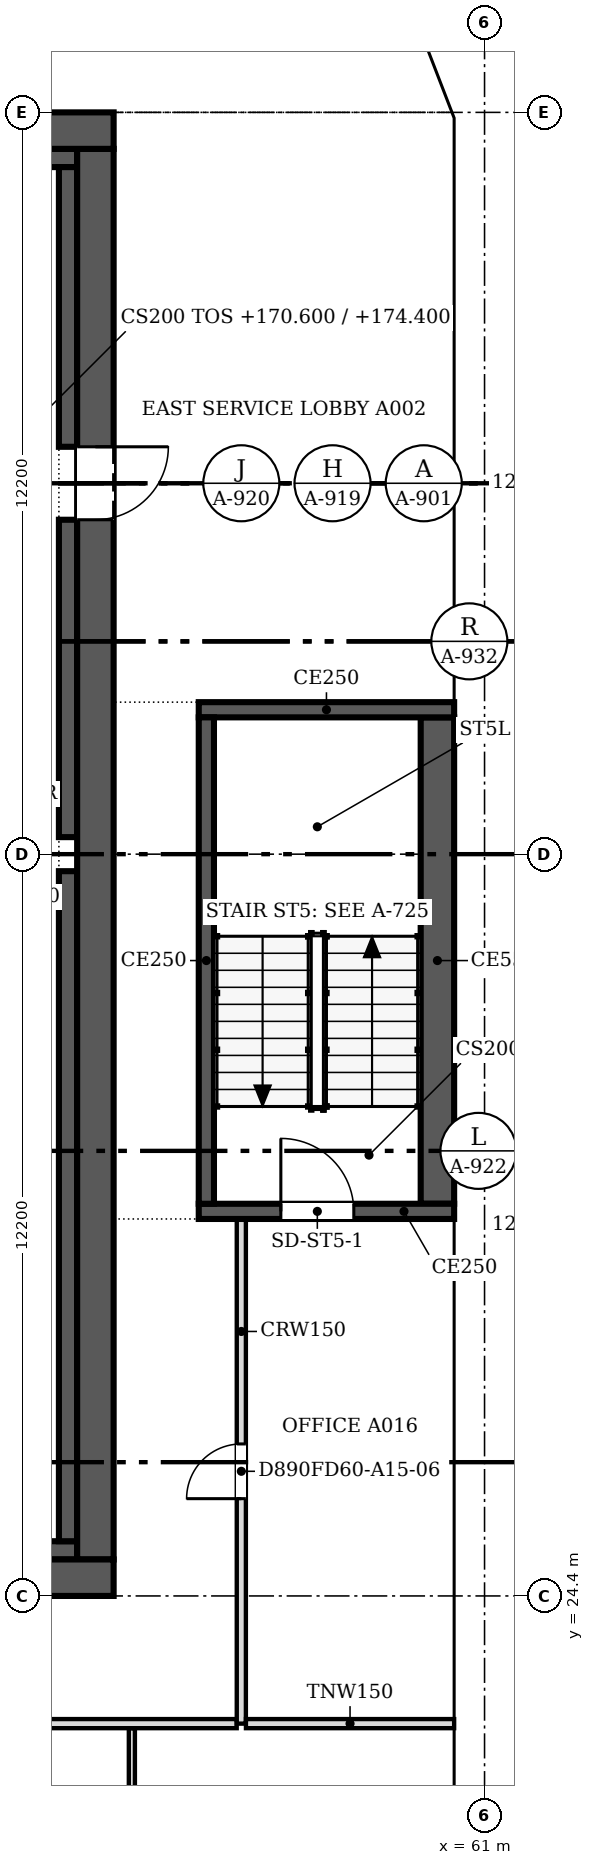
"""IFC4 building model, lengths in metres.
Left out: names, types, materials, properties, quantities, classifications, styles, units other than length and angle.
Written with IfcOpenShell. Run it as: python <this file> out.ifc"""

import sys

from ifc_helpers import new_model, si_unit, direction, frame, frame_2d, origin, place, context, subcontext, project, spatial, polyline, rectangle, outline, extrude, faceted_brep, source, transform, mapped, element, fill, save


model = new_model("IFC4")
c1 = context("Model", 3, precision=1e-05, world=origin(), true_north=direction((0.0, 1.0)))
c2 = subcontext(c1, "Body", "Model", "MODEL_VIEW")
j1 = project(units=[si_unit("LENGTHUNIT", "METRE"), si_unit("PLANEANGLEUNIT", "RADIAN")], contexts=[c1])
p1 = place(None, origin())
s1 = spatial("IfcSite", under=j1, at=p1, CompositionType="ELEMENT")
p2 = place(p1, origin())
s2 = spatial("IfcBuilding", under=s1, at=p2, CompositionType="ELEMENT")
p3 = place(p2, frame((0.0, 0.0, 170.6)))
s3 = spatial("IfcBuildingStorey", under=s2, at=p3, CompositionType="ELEMENT", Elevation=170.6)
m1 = source(origin(), c2, "Body", "Brep", [
    faceted_brep([(3.05, -0.25, 0.0), (6.1, -0.25, 3.8), (6.1, -0.25, 3.8), (3.05, -0.25, 7.6), (0.0, -0.25, 3.8), (0.0, 0.25, 3.8), (3.05, 0.25, 7.6), (6.1, 0.25, 3.8), (6.1, 0.25, 3.8), (3.05, 0.25, 0.0)], [[[0, 1, 2, 3, 4]], [[5, 6, 7, 8, 9]], [[9, 8, 1, 0]], [[7, 6, 3, 2]], [[6, 5, 4, 3]], [[5, 9, 0, 4]], [[1, 8, 7, 2]]]),
])
p4 = place(p3, frame((60.75, 18.3, -3.8), z_axis=(0.0, 0.0, 1.0), x_axis=(0.0, 1.0, 0.0)))
e1 = element("IfcWall", 1, at=p4, inside=s3, PredefinedType="SOLIDWALL", context=c2, shape_type="MappedRepresentation", body=[
    mapped(m1, transform((0.0, 0.0, 0.0), scale=1.0)),
])
m2 = source(origin(), c2, "Body", "SweptSolid", [
    extrude(outline(polyline([(3.05, 0.399), (5.78, 3.8), (3.05, 7.2), (0.321, 3.8), (3.05, 0.399)])), frame((0.0, 0.26, 0.0), z_axis=(0.0, -1.0, 0.0), x_axis=(1.0, 0.0, 0.0)), (0.0, 0.0, 1.0), 0.52),
])
p5 = place(p4, origin())
e2 = element("IfcOpeningElement", 2, at=p5, cuts=e1, PredefinedType="OPENING", context=c2, shape_type="MappedRepresentation", body=[
    mapped(m2, transform((0.0, 0.0, 0.0), scale=1.0)),
])
m3 = source(origin(), c2, "Body", "SweptSolid", [
    extrude(outline(polyline([(3.05, 0.0), (6.1, 3.8), (3.05, 7.6), (0.0, 3.8), (3.05, 0.0)])), frame((0.0, 0.25, 0.0), z_axis=(0.0, -1.0, 0.0), x_axis=(1.0, 0.0, 0.0)), (0.0, 0.0, 1.0), 0.5),
])
p6 = place(p3, frame((60.75, 24.4, -3.8), z_axis=(0.0, 0.0, 1.0), x_axis=(0.0, 1.0, 0.0)))
e3 = element("IfcWall", 3, at=p6, inside=s3, PredefinedType="SOLIDWALL", context=c2, shape_type="MappedRepresentation", body=[
    mapped(m3, transform((0.0, 0.0, 0.0), scale=1.0)),
])
p7 = place(p6, origin())
e4 = element("IfcOpeningElement", 4, at=p7, cuts=e3, PredefinedType="OPENING", context=c2, shape_type="MappedRepresentation", body=[
    mapped(m2, transform((0.0, 0.0, 0.0), scale=1.0)),
])
p8 = place(p3, frame((60.75, 30.5, -3.8), z_axis=(0.0, 0.0, 1.0), x_axis=(0.0, 1.0, 0.0)))
e5 = element("IfcWall", 5, at=p8, inside=s3, PredefinedType="SOLIDWALL", context=c2, shape_type="MappedRepresentation", body=[
    mapped(m3, transform((0.0, 0.0, 0.0), scale=1.0)),
])
p9 = place(p8, origin())
e6 = element("IfcOpeningElement", 6, at=p9, cuts=e5, PredefinedType="OPENING", context=c2, shape_type="MappedRepresentation", body=[
    mapped(m2, transform((0.0, 0.0, 0.0), scale=1.0)),
])
p10 = place(p3, frame((60.75, 36.6, -3.8), z_axis=(0.0, 0.0, 1.0), x_axis=(0.0, 1.0, 0.0)))
e7 = element("IfcWall", 7, at=p10, inside=s3, PredefinedType="SOLIDWALL", context=c2, shape_type="MappedRepresentation", body=[
    mapped(m1, transform((0.0, 0.0, 0.0), scale=1.0)),
])
p11 = place(p10, origin())
e8 = element("IfcOpeningElement", 8, at=p11, cuts=e7, PredefinedType="OPENING", context=c2, shape_type="MappedRepresentation", body=[
    mapped(m2, transform((0.0, 0.0, 0.0), scale=1.0)),
])
m4 = source(origin(), c2, "Body", "Brep", [
    faceted_brep([(3.05, -0.25, 0.0), (6.053, -0.25, 3.8), (3.05, -0.25, 7.6), (0.0, -0.25, 3.8), (0.0, 0.25, 3.8), (3.05, 0.25, 7.6), (6.007, 0.25, 3.859), (6.007, 0.25, 3.741), (3.05, 0.25, 0.0), (6.053, 0.0, 3.8)], [[[0, 1, 2, 3]], [[4, 5, 6, 7, 8]], [[8, 7, 9, 1, 0]], [[6, 5, 2, 1, 9]], [[5, 4, 3, 2]], [[4, 8, 0, 3]], [[7, 6, 9]]]),
])
p12 = place(p3, frame((60.75, 42.7, -3.8), z_axis=(0.0, 0.0, 1.0), x_axis=(0.0, 1.0, 0.0)))
e9 = element("IfcWall", 9, at=p12, inside=s3, PredefinedType="SOLIDWALL", context=c2, shape_type="MappedRepresentation", body=[
    mapped(m4, transform((0.0, 0.0, 0.0), scale=1.0)),
])
m5 = source(origin(), c2, "Body", "SweptSolid", [
    extrude(outline(polyline([(3.049, 0.401), (5.735, 3.8), (3.049, 7.199), (0.321, 3.8), (3.049, 0.401)])), frame((0.0, 0.26, 0.0), z_axis=(0.0, -1.0, 0.0), x_axis=(1.0, 0.0, 0.0)), (0.0, 0.0, 1.0), 0.52),
])
p13 = place(p12, origin())
e10 = element("IfcOpeningElement", 10, at=p13, cuts=e9, PredefinedType="OPENING", context=c2, shape_type="MappedRepresentation", body=[
    mapped(m5, transform((0.0, 0.0, 0.0), scale=1.0)),
])
m6 = source(origin(), c2, "Body", "Brep", [
    faceted_brep([(2.95, -0.25, 0.0), (3.003, -0.25, 0.068), (3.003, -0.25, 7.531), (2.95, -0.25, 7.6), (0.0, -0.25, 3.8), (0.047, 0.25, 3.86), (2.898, 0.25, 7.532), (2.898, 0.25, 0.068), (0.047, 0.25, 3.74), (2.95, 0.0, 0.0), (2.95, 0.0, 7.6), (0.0, 0.0, 3.8)], [[[0, 1, 2, 3, 4]], [[5, 6, 7, 8]], [[1, 0, 9]], [[10, 3, 2]], [[6, 5, 11, 4, 3, 10]], [[8, 7, 9, 0, 4, 11]], [[8, 11, 5]], [[1, 9, 7, 6, 10, 2]]]),
])
p14 = place(p3, frame((60.75, 48.753, -3.8), z_axis=(0.0, 0.0, 1.0), x_axis=(-0.35992665181, 0.932980602862, 0.0)))
e11 = element("IfcWall", 11, at=p14, inside=s3, PredefinedType="SOLIDWALL", context=c2, shape_type="MappedRepresentation", body=[
    mapped(m6, transform((0.0, 0.0, 0.0), scale=1.0)),
])
m7 = source(origin(), c2, "Body", "SweptSolid", [
    extrude(outline(polyline([(2.75, 6.935), (0.316, 3.8), (2.75, 0.665), (2.75, 6.935)])), frame((0.0, 0.26, 0.0), z_axis=(0.0, -1.0, 0.0), x_axis=(1.0, 0.0, 0.0)), (0.0, 0.0, 1.0), 0.52),
])
p15 = place(p14, origin())
e12 = element("IfcOpeningElement", 12, at=p15, cuts=e11, PredefinedType="OPENING", context=c2, shape_type="MappedRepresentation", body=[
    mapped(m7, transform((0.0, 0.0, 0.0), scale=1.0)),
])
p16 = place(p2, frame((0.0, 0.0, 174.4)))
s4 = spatial("IfcBuildingStorey", under=s2, at=p16, CompositionType="ELEMENT", Elevation=174.4)
m8 = source(origin(), c2, "Body", "SweptSolid", [
    extrude(outline(polyline([(3.05, 0.0), (6.1, 3.8), (3.05, 7.6), (0.0, 3.8), (3.05, 0.0)])), frame((0.0, 0.25, 0.0), z_axis=(0.0, -1.0, 0.0), x_axis=(1.0, 0.0, 0.0)), (0.0, 0.0, 1.0), 0.5),
])
p17 = place(p16, frame((60.75, 15.25, -3.8), z_axis=(0.0, 0.0, 1.0), x_axis=(0.0, 1.0, 0.0)))
e13 = element("IfcWall", 13, at=p17, inside=s4, PredefinedType="SOLIDWALL", context=c2, shape_type="MappedRepresentation", body=[
    mapped(m8, transform((0.0, 0.0, 0.0), scale=1.0)),
])
m9 = source(origin(), c2, "Body", "SweptSolid", [
    extrude(outline(polyline([(3.05, 0.399), (5.78, 3.8), (3.05, 7.2), (0.321, 3.8), (3.05, 0.399)])), frame((0.0, 0.26, 0.0), z_axis=(0.0, -1.0, 0.0), x_axis=(1.0, 0.0, 0.0)), (0.0, 0.0, 1.0), 0.52),
])
p18 = place(p17, origin())
e14 = element("IfcOpeningElement", 14, at=p18, cuts=e13, PredefinedType="OPENING", context=c2, shape_type="MappedRepresentation", body=[
    mapped(m9, transform((0.0, 0.0, 0.0), scale=1.0)),
])
m10 = source(origin(), c2, "Body", "Brep", [
    faceted_brep([(3.05, -0.25, 0.0), (6.1, -0.25, 3.8), (6.1, -0.25, 3.8), (3.05, -0.25, 7.6), (0.0, -0.25, 3.8), (0.0, 0.25, 3.8), (3.05, 0.25, 7.6), (6.1, 0.25, 3.8), (6.1, 0.25, 3.8), (3.05, 0.25, 0.0)], [[[0, 1, 2, 3, 4]], [[5, 6, 7, 8, 9]], [[9, 8, 1, 0]], [[7, 6, 3, 2]], [[6, 5, 4, 3]], [[5, 9, 0, 4]], [[1, 8, 7, 2]]]),
])
p19 = place(p16, frame((60.75, 21.35, -3.8), z_axis=(0.0, 0.0, 1.0), x_axis=(0.0, 1.0, 0.0)))
e15 = element("IfcWall", 15, at=p19, inside=s4, PredefinedType="SOLIDWALL", context=c2, shape_type="MappedRepresentation", body=[
    mapped(m10, transform((0.0, 0.0, 0.0), scale=1.0)),
])
p20 = place(p19, origin())
e16 = element("IfcOpeningElement", 16, at=p20, cuts=e15, PredefinedType="OPENING", context=c2, shape_type="MappedRepresentation", body=[
    mapped(m9, transform((0.0, 0.0, 0.0), scale=1.0)),
])
p21 = place(p16, frame((60.75, 27.45, -3.8), z_axis=(0.0, 0.0, 1.0), x_axis=(0.0, 1.0, 0.0)))
e17 = element("IfcWall", 17, at=p21, inside=s4, PredefinedType="SOLIDWALL", context=c2, shape_type="MappedRepresentation", body=[
    mapped(m8, transform((0.0, 0.0, 0.0), scale=1.0)),
])
p22 = place(p21, origin())
e18 = element("IfcOpeningElement", 18, at=p22, cuts=e17, PredefinedType="OPENING", context=c2, shape_type="MappedRepresentation", body=[
    mapped(m9, transform((0.0, 0.0, 0.0), scale=1.0)),
])
p23 = place(p16, frame((60.75, 33.55, -3.8), z_axis=(0.0, 0.0, 1.0), x_axis=(0.0, 1.0, 0.0)))
e19 = element("IfcWall", 19, at=p23, inside=s4, PredefinedType="SOLIDWALL", context=c2, shape_type="MappedRepresentation", body=[
    mapped(m10, transform((0.0, 0.0, 0.0), scale=1.0)),
])
p24 = place(p23, origin())
e20 = element("IfcOpeningElement", 20, at=p24, cuts=e19, PredefinedType="OPENING", context=c2, shape_type="MappedRepresentation", body=[
    mapped(m9, transform((0.0, 0.0, 0.0), scale=1.0)),
])
p25 = place(p16, frame((60.75, 39.65, -3.8), z_axis=(0.0, 0.0, 1.0), x_axis=(0.0, 1.0, 0.0)))
e21 = element("IfcWall", 21, at=p25, inside=s4, PredefinedType="SOLIDWALL", context=c2, shape_type="MappedRepresentation", body=[
    mapped(m8, transform((0.0, 0.0, 0.0), scale=1.0)),
])
p26 = place(p25, origin())
e22 = element("IfcOpeningElement", 22, at=p26, cuts=e21, PredefinedType="OPENING", context=c2, shape_type="MappedRepresentation", body=[
    mapped(m9, transform((0.0, 0.0, 0.0), scale=1.0)),
])
m11 = source(origin(), c2, "Body", "Brep", [
    faceted_brep([(3.003, -0.25, 0.0), (3.05, -0.25, 0.06), (3.05, -0.25, 7.54), (3.003, -0.25, 7.6), (0.0, -0.25, 3.8), (0.0, 0.25, 3.8), (2.957, 0.25, 7.541), (2.957, 0.25, 0.059), (3.003, 0.0, 0.0), (3.003, 0.0, 7.6)], [[[0, 1, 2, 3, 4]], [[5, 6, 7]], [[1, 0, 8]], [[9, 3, 2]], [[6, 5, 4, 3, 9]], [[5, 7, 8, 0, 4]], [[1, 8, 7, 6, 9, 2]]]),
])
p27 = place(p16, frame((60.75, 45.75, -3.8), z_axis=(0.0, 0.0, 1.0), x_axis=(0.0, 1.0, 0.0)))
e23 = element("IfcWall", 23, at=p27, inside=s4, PredefinedType="SOLIDWALL", context=c2, shape_type="MappedRepresentation", body=[
    mapped(m11, transform((0.0, 0.0, 0.0), scale=1.0)),
])
m12 = source(origin(), c2, "Body", "SweptSolid", [
    extrude(outline(polyline([(2.803, 6.944), (0.319, 3.8), (2.803, 0.656), (2.803, 6.944)])), frame((0.0, 0.26, 0.0), z_axis=(0.0, -1.0, 0.0), x_axis=(1.0, 0.0, 0.0)), (0.0, 0.0, 1.0), 0.52),
])
p28 = place(p27, origin())
e24 = element("IfcOpeningElement", 24, at=p28, cuts=e23, PredefinedType="OPENING", context=c2, shape_type="MappedRepresentation", body=[
    mapped(m12, transform((0.0, 0.0, 0.0), scale=1.0)),
])
m13 = source(origin(), c2, "Body", "Brep", [
    faceted_brep([(0.047, -0.25, 0.0), (2.997, -0.25, 3.8), (0.047, -0.25, 7.6), (0.0, -0.25, 7.541), (0.0, -0.25, 0.059), (0.093, 0.25, 7.54), (2.944, 0.25, 3.868), (2.944, 0.25, 3.732), (0.093, 0.25, 0.06), (2.997, 0.0, 3.8), (0.047, 0.0, 0.0), (0.047, 0.0, 7.6)], [[[0, 1, 2, 3, 4]], [[5, 6, 7, 8]], [[8, 7, 9, 1, 0, 10]], [[6, 5, 11, 2, 1, 9]], [[3, 2, 11]], [[10, 0, 4]], [[8, 10, 4, 3, 11, 5]], [[9, 7, 6]]]),
])
p29 = place(p16, frame((60.767, 48.71, -3.8), z_axis=(0.0, 0.0, 1.0), x_axis=(-0.359901446078, 0.932990326376, 0.0)))
e25 = element("IfcWall", 25, at=p29, inside=s4, PredefinedType="SOLIDWALL", context=c2, shape_type="MappedRepresentation", body=[
    mapped(m13, transform((0.0, 0.0, 0.0), scale=1.0)),
])
m14 = source(origin(), c2, "Body", "SweptSolid", [
    extrude(outline(polyline([(0.247, 0.665), (2.681, 3.8), (0.247, 6.935), (0.247, 0.665)])), frame((0.0, 0.26, 0.0), z_axis=(0.0, -1.0, 0.0), x_axis=(1.0, 0.0, 0.0)), (0.0, 0.0, 1.0), 0.52),
])
p30 = place(p29, origin())
e26 = element("IfcOpeningElement", 26, at=p30, cuts=e25, PredefinedType="OPENING", context=c2, shape_type="MappedRepresentation", body=[
    mapped(m14, transform((0.0, 0.0, 0.0), scale=1.0)),
])
p31 = place(p3, frame((54.9, 24.7, 0.0), z_axis=(0.0, 0.0, 1.0), x_axis=(-1.0, 0.0, 0.0)))
e27 = element("IfcWall", 27, at=p31, inside=s3, PredefinedType="SHEAR", context=c2, shape_type="SweptSolid", body=[
    extrude(rectangle(XDim=24.4, YDim=0.6, at=frame_2d((12.2, 0.0))), origin(), (0.0, 0.0, 1.0), 3.8),
])
m15 = source(origin(), c2, "Body", "SweptSolid", [
    extrude(rectangle(XDim=1.2, YDim=2.1, at=frame_2d((0.6, 1.05))), frame((0.0, 0.31, 0.0), z_axis=(0.0, -1.0, 0.0), x_axis=(1.0, 0.0, 0.0)), (0.0, 0.0, 1.0), 0.62),
])
p32 = place(p31, frame((1.5, 0.0, 0.0)))
e28 = element("IfcOpeningElement", 28, at=p32, cuts=e27, PredefinedType="OPENING", context=c2, shape_type="MappedRepresentation", body=[
    mapped(m15, transform((0.0, 0.0, 0.0), scale=1.0)),
])
p33 = place(p3, frame((30.5, 48.5, 0.0), z_axis=(0.0, 0.0, 1.0), x_axis=(1.0, 0.0, 0.0)))
e29 = element("IfcWall", 29, at=p33, inside=s3, PredefinedType="SHEAR", context=c2, shape_type="SweptSolid", body=[
    extrude(rectangle(XDim=24.4, YDim=0.6, at=frame_2d((12.2, 0.0))), origin(), (0.0, 0.0, 1.0), 3.8),
])
p34 = place(p3, frame((54.6, 48.2, 0.0), z_axis=(0.0, 0.0, 1.0), x_axis=(0.0, -1.0, 0.0)))
e30 = element("IfcWall", 30, at=p34, inside=s3, PredefinedType="SHEAR", context=c2, shape_type="SweptSolid", body=[
    extrude(rectangle(XDim=23.2, YDim=0.6, at=frame_2d((11.6, 0.0))), origin(), (0.0, 0.0, 1.0), 3.8),
])
p35 = place(p34, frame((4.9, 0.0, 0.0)))
e31 = element("IfcOpeningElement", 31, at=p35, cuts=e30, PredefinedType="OPENING", context=c2, shape_type="MappedRepresentation", body=[
    mapped(m15, transform((0.0, 0.0, 0.0), scale=1.0)),
])
p36 = place(p3, frame((53.4, 25.15, 0.0), z_axis=(0.0, 0.0, 1.0), x_axis=(1.0, 0.0, 0.0)))
e32 = element("IfcWall", 32, at=p36, inside=s3, PredefinedType="SOLIDWALL", context=c2, shape_type="SweptSolid", body=[
    extrude(rectangle(XDim=0.9, YDim=0.3, at=frame_2d((0.45, 0.0))), origin(), (0.0, 0.0, 1.0), 3.8),
])
p37 = place(p3, frame((31.1, 48.05, 0.0), z_axis=(0.0, 0.0, 1.0), x_axis=(1.0, 0.0, 0.0)))
e33 = element("IfcWall", 33, at=p37, inside=s3, PredefinedType="SOLIDWALL", context=c2, shape_type="SweptSolid", body=[
    extrude(rectangle(XDim=23.2, YDim=0.3, at=frame_2d((11.6, 0.0))), origin(), (0.0, 0.0, 1.0), 3.8),
])
p38 = place(p3, frame((54.15, 25.3, 0.0), z_axis=(0.0, 0.0, 1.0), x_axis=(0.0, 1.0, 0.0)))
e34 = element("IfcWall", 34, at=p38, inside=s3, PredefinedType="SOLIDWALL", context=c2, shape_type="SweptSolid", body=[
    extrude(rectangle(XDim=11.02, YDim=0.3, at=frame_2d((5.51, 0.0))), origin(), (0.0, 0.0, 1.0), 3.8),
])
p39 = place(p3, frame((54.15, 36.88, 0.0), z_axis=(0.0, 0.0, 1.0), x_axis=(0.0, 1.0, 0.0)))
e35 = element("IfcWall", 35, at=p39, inside=s3, PredefinedType="SOLIDWALL", context=c2, shape_type="SweptSolid", body=[
    extrude(rectangle(XDim=5.22, YDim=0.3, at=frame_2d((2.61, 0.0))), origin(), (0.0, 0.0, 1.0), 3.8),
])
p40 = place(p3, frame((54.15, 43.3, 0.0), z_axis=(0.0, 0.0, 1.0), x_axis=(0.0, 1.0, 0.0)))
e36 = element("IfcWall", 36, at=p40, inside=s3, PredefinedType="SOLIDWALL", context=c2, shape_type="SweptSolid", body=[
    extrude(rectangle(XDim=4.6, YDim=0.3, at=frame_2d((2.3, 0.0))), origin(), (0.0, 0.0, 1.0), 3.8),
])
p41 = place(p3, frame((60.5, 30.725, 0.0), z_axis=(0.0, 0.0, 1.0), x_axis=(-1.0, 0.0, 0.0)))
e37 = element("IfcWall", 37, at=p41, inside=s3, PredefinedType="SOLIDWALL", context=c2, shape_type="SweptSolid", body=[
    extrude(rectangle(XDim=4.2, YDim=0.25, at=frame_2d((2.1, 0.0))), origin(), (0.0, 0.0, 1.0), 3.8),
])
m16 = source(origin(), c2, "Body", "SweptSolid", [
    extrude(rectangle(XDim=1.2, YDim=2.1, at=frame_2d((0.6, 1.05))), frame((0.0, 0.135, 0.0), z_axis=(0.0, -1.0, 0.0), x_axis=(1.0, 0.0, 0.0)), (0.0, 0.0, 1.0), 0.27),
])
p42 = place(p41, frame((1.65, 0.0, 0.0)))
e38 = element("IfcOpeningElement", 38, at=p42, cuts=e37, PredefinedType="OPENING", context=c2, shape_type="MappedRepresentation", body=[
    mapped(m16, transform((0.0, 0.0, 0.0), scale=1.0)),
])
p43 = place(p3, frame((56.425, 30.85, 0.0), z_axis=(0.0, 0.0, 1.0), x_axis=(0.0, 1.0, 0.0)))
e39 = element("IfcWall", 39, at=p43, inside=s3, PredefinedType="SOLIDWALL", context=c2, shape_type="SweptSolid", body=[
    extrude(rectangle(XDim=8.0, YDim=0.25, at=frame_2d((4.0, 0.0))), origin(), (0.0, 0.0, 1.0), 3.8),
])
p44 = place(p3, frame((56.3, 38.975, 0.0), z_axis=(0.0, 0.0, 1.0), x_axis=(1.0, 0.0, 0.0)))
e40 = element("IfcWall", 40, at=p44, inside=s3, PredefinedType="SOLIDWALL", context=c2, shape_type="SweptSolid", body=[
    extrude(rectangle(XDim=4.2, YDim=0.25, at=frame_2d((2.1, 0.0))), origin(), (0.0, 0.0, 1.0), 3.8),
])
p45 = place(p3, frame((60.225, 38.85, 0.0), z_axis=(0.0, 0.0, 1.0), x_axis=(0.0, -1.0, 0.0)))
e41 = element("IfcWall", 41, at=p45, inside=s3, PredefinedType="SOLIDWALL", context=c2, shape_type="SweptSolid", body=[
    extrude(rectangle(XDim=8.0, YDim=0.55, at=frame_2d((4.0, 0.0))), origin(), (0.0, 0.0, 1.0), 3.8),
])
p46 = place(p3, frame((55.2, 22.224, 0.0), z_axis=(0.0, 0.0, 1.0), x_axis=(0.0, -1.0, 0.0)))
e42 = element("IfcWall", 42, at=p46, inside=s3, PredefinedType="PARTITIONING", context=c2, shape_type="SweptSolid", body=[
    extrude(rectangle(XDim=5.048, YDim=0.1, at=frame_2d((2.524, 0.0))), origin(), (0.0, 0.0, 1.0), 3.067),
])
m17 = source(origin(), c2, "Body", "SweptSolid", [
    extrude(rectangle(XDim=0.9, YDim=2.1, at=frame_2d((0.45, 1.05))), frame((0.0, 0.06, 0.0), z_axis=(0.0, -1.0, 0.0), x_axis=(1.0, 0.0, 0.0)), (0.0, 0.0, 1.0), 0.12),
])
p47 = place(p46, frame((2.048, 0.0, 0.0)))
e43 = element("IfcOpeningElement", 43, at=p47, cuts=e42, PredefinedType="OPENING", context=c2, shape_type="MappedRepresentation", body=[
    mapped(m17, transform((0.0, 0.0, 0.0), scale=1.0)),
])
p48 = place(p3, frame((47.4, 22.3, 0.0), z_axis=(0.0, 0.0, 1.0), x_axis=(1.0, 0.0, 0.0)))
e44 = element("IfcWall", 44, at=p48, inside=s3, PredefinedType="PARTITIONING", context=c2, shape_type="SweptSolid", body=[
    extrude(rectangle(XDim=9.524, YDim=0.15, at=frame_2d((4.762, 0.0))), origin(), (0.0, 0.0, 1.0), 3.067),
])
p49 = place(p3, frame((57.0, 30.6, 0.0), z_axis=(0.0, 0.0, 1.0), x_axis=(0.0, -1.0, 0.0)))
e45 = element("IfcWall", 45, at=p49, inside=s3, PredefinedType="PARTITIONING", context=c2, shape_type="SweptSolid", body=[
    extrude(rectangle(XDim=8.3, YDim=0.15, at=frame_2d((4.15, 0.0))), origin(), (0.0, 0.0, 1.0), 3.067),
])
m18 = source(origin(), c2, "Body", "SweptSolid", [
    extrude(rectangle(XDim=0.9, YDim=2.1, at=frame_2d((0.45, 1.05))), frame((0.0, 0.085, 0.0), z_axis=(0.0, -1.0, 0.0), x_axis=(1.0, 0.0, 0.0)), (0.0, 0.0, 1.0), 0.17),
])
p50 = place(p49, frame((3.7, 0.0, 0.0)))
e46 = element("IfcOpeningElement", 46, at=p50, cuts=e45, PredefinedType="OPENING", context=c2, shape_type="MappedRepresentation", body=[
    mapped(m18, transform((0.0, 0.0, 0.0), scale=1.0)),
])
p51 = place(p3, frame((57.076, 22.3, 0.0), z_axis=(0.0, 0.0, 1.0), x_axis=(1.0, 0.0, 0.0)))
e47 = element("IfcWall", 47, at=p51, inside=s3, PredefinedType="PARTITIONING", context=c2, shape_type="SweptSolid", body=[
    extrude(rectangle(XDim=3.424, YDim=0.15, at=frame_2d((1.712, 0.0))), origin(), (0.0, 0.0, 1.0), 3.067),
])
m19 = source(origin(), c2, "Body", "SweptSolid", [
    extrude(rectangle(XDim=1.2, YDim=2.1, at=frame_2d((0.6, 1.05))), frame((0.0, 0.025, 0.0), z_axis=(0.0, -1.0, 0.0), x_axis=(1.0, 0.0, 0.0)), (0.0, 0.0, 1.0), 0.05),
])
p52 = place(p35, origin())
e48 = element("IfcDoor", 48, at=p52, inside=s3, OperationType="SINGLE_SWING_LEFT", PredefinedType="DOOR", context=c2, shape_type="MappedRepresentation", body=[
    mapped(m19, transform((0.0, 0.0, 0.0), scale=1.0)),
])
fill(e31, e48)
p53 = place(p42, origin())
e49 = element("IfcDoor", 49, at=p53, inside=s3, OperationType="SINGLE_SWING_RIGHT", PredefinedType="DOOR", context=c2, shape_type="MappedRepresentation", body=[
    mapped(m19, transform((0.0, 0.0, 0.0), scale=1.0)),
])
fill(e38, e49)
m20 = source(origin(), c2, "Body", "SweptSolid", [
    extrude(rectangle(XDim=0.9, YDim=2.1, at=frame_2d((0.45, 1.05))), frame((0.0, 0.025, 0.0), z_axis=(0.0, -1.0, 0.0), x_axis=(1.0, 0.0, 0.0)), (0.0, 0.0, 1.0), 0.05),
])
p54 = place(p50, origin())
e50 = element("IfcDoor", 50, at=p54, inside=s3, OperationType="SINGLE_SWING_RIGHT", PredefinedType="DOOR", context=c2, shape_type="MappedRepresentation", body=[
    mapped(m20, transform((0.0, 0.0, 0.0), scale=1.0)),
])
fill(e46, e50)
save(model, sys.argv[1])
